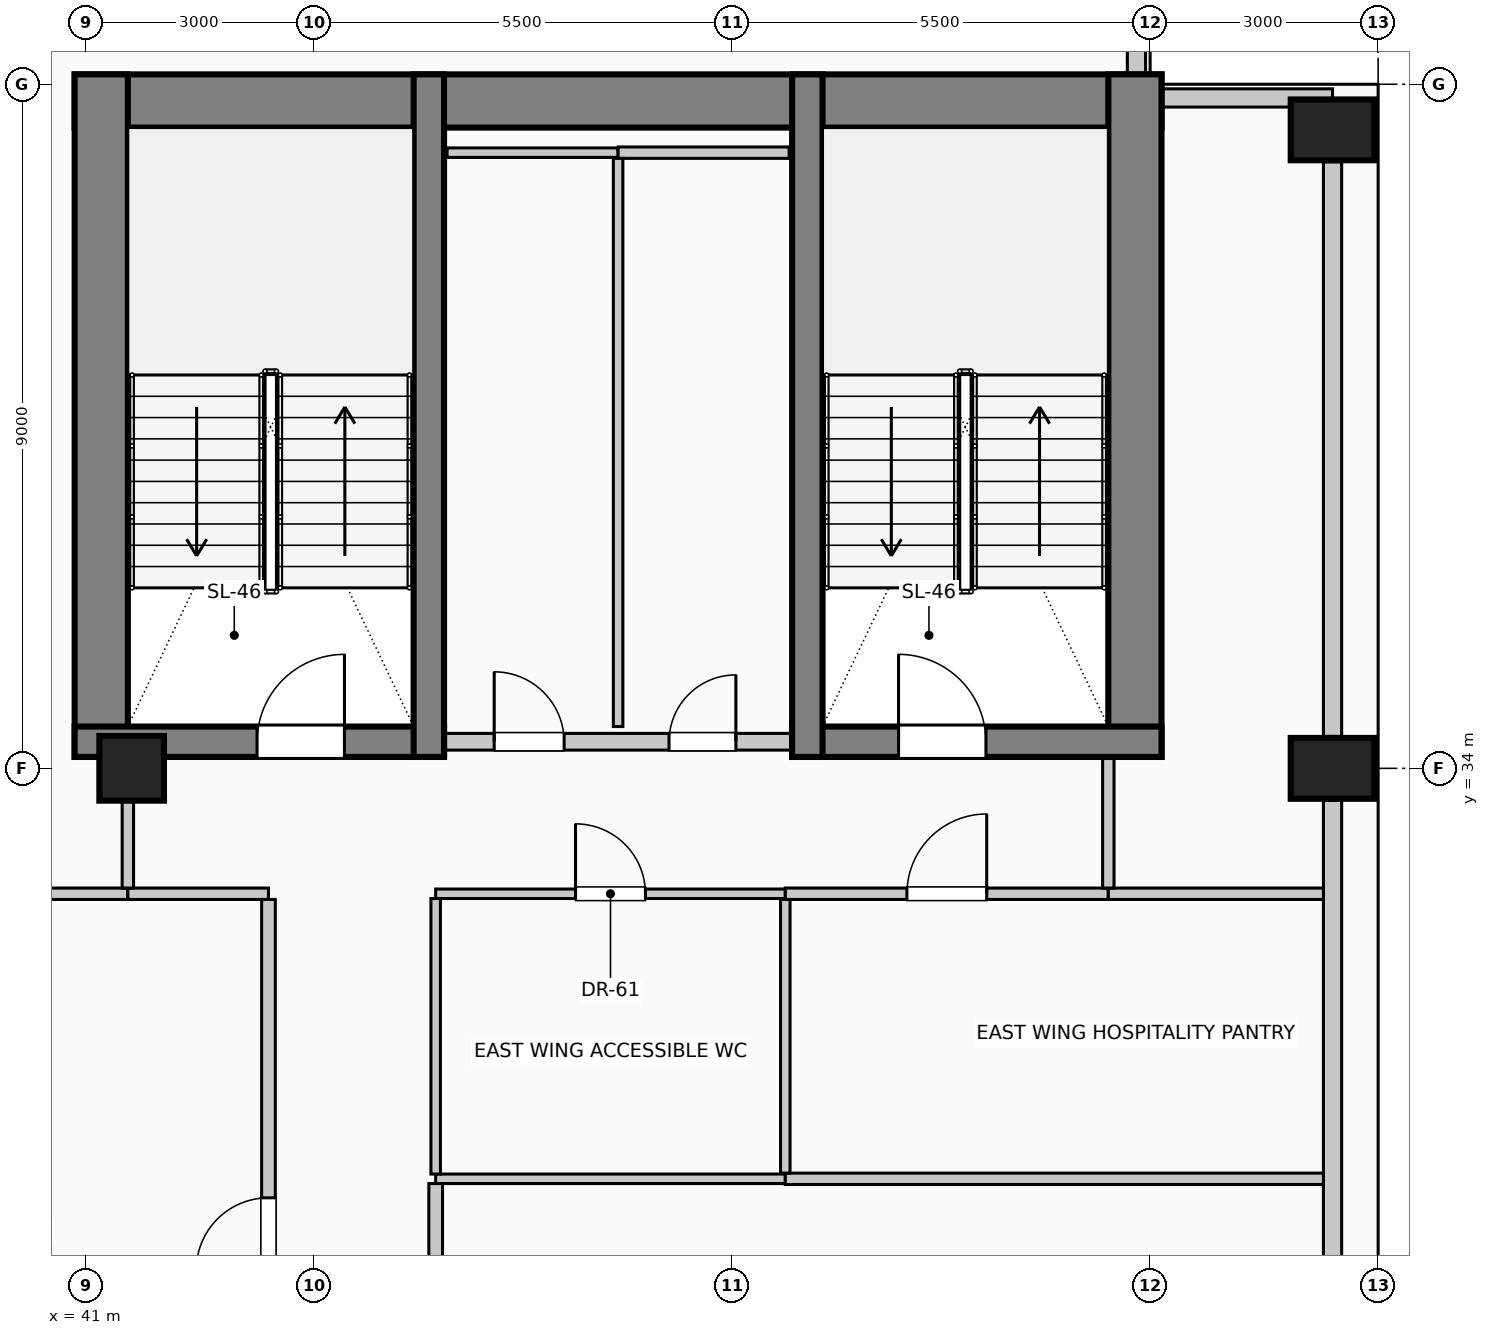
"""IFC4 building model, lengths in metres.
Left out: names, types, materials, properties, quantities, classifications, styles, units other than length and angle.
Written with IfcOpenShell. Run it as: python <this file> out.ifc"""

import sys

from ifc_helpers import new_model, si_unit, direction, frame, frame_2d, origin, origin_2d, place, context, subcontext, project, spatial, rectangle, circle, extrude, element, fill, save


model = new_model("IFC4")
c1 = context("Model", 3, precision=1e-05, world=origin(), true_north=direction((0.0, 1.0)))
c2 = subcontext(c1, "Body", "Model", "MODEL_VIEW")
j1 = project(units=[si_unit("LENGTHUNIT", "METRE"), si_unit("PLANEANGLEUNIT", "RADIAN")], contexts=[c1])
p1 = place(None, origin())
s1 = spatial("IfcSite", under=j1, at=p1, CompositionType="ELEMENT")
p2 = place(p1, origin())
s2 = spatial("IfcBuilding", under=s1, at=p2, CompositionType="ELEMENT")
p3 = place(p2, frame((0.0, 0.0, 190.6)))
s3 = spatial("IfcBuildingStorey", under=s2, at=p3, CompositionType="ELEMENT", Elevation=190.6)
p4 = place(p3, frame((40.85, 42.78, 0.0), z_axis=(0.0, 0.0, 1.0), x_axis=(1.0, 0.0, 0.0)))
e1 = element("IfcWall", 1, at=p4, inside=s3, PredefinedType="SHEAR", context=c2, shape_type="SweptSolid", body=[
    extrude(rectangle(XDim=14.3, YDim=0.7, at=frame_2d((7.15, 0.0))), origin(), (0.0, 0.0, 1.0), 4.0),
])
for number, where, z_axis, x_axis in (
    (2, (41.2, 34.15, 0.0), (0.0, 0.0, 1.0), (0.0, 1.0, 0.0)),
    (3, (54.8, 34.15, 0.0), (0.0, 0.0, 1.0), (0.0, 1.0, 0.0)),
):
    element("IfcWall", number, at=place(p3, frame(where, z_axis=z_axis, x_axis=x_axis)), inside=s3, PredefinedType="SHEAR", context=c2, shape_type="SweptSolid", body=[
        extrude(rectangle(XDim=8.98, YDim=0.7, at=frame_2d((4.49, 0.0))), origin(), (0.0, 0.0, 1.0), 4.0),
    ])
p5 = place(p3, frame((40.85, 34.35, 0.0), z_axis=(0.0, 0.0, 1.0), x_axis=(1.0, 0.0, 0.0)))
e4 = element("IfcWall", 4, at=p5, inside=s3, PredefinedType="SHEAR", context=c2, shape_type="SweptSolid", body=[
    extrude(rectangle(XDim=4.86, YDim=0.4, at=frame_2d((2.43, 0.0))), origin(), (0.0, 0.0, 1.0), 4.0),
])
p6 = place(p5, frame((2.4, 0.0, 0.0)))
e5 = element("IfcOpeningElement", 5, at=p6, cuts=e4, PredefinedType="OPENING", context=c2, shape_type="SweptSolid", body=[
    extrude(rectangle(XDim=1.15, YDim=2.2, at=frame_2d((0.575, 1.1))), frame((0.0, 0.21, 0.0), z_axis=(0.0, -1.0, 0.0), x_axis=(1.0, 0.0, 0.0)), (0.0, 0.0, 1.0), 0.42),
])
p7 = place(p3, frame((45.51, 34.15, 0.0), z_axis=(0.0, 0.0, 1.0), x_axis=(0.0, 1.0, 0.0)))
e6 = element("IfcWall", 6, at=p7, inside=s3, PredefinedType="SHEAR", context=c2, shape_type="SweptSolid", body=[
    extrude(rectangle(XDim=8.98, YDim=0.4, at=frame_2d((4.49, 0.0))), origin(), (0.0, 0.0, 1.0), 4.0),
])
p8 = place(p3, frame((50.29, 34.35, 0.0), z_axis=(0.0, 0.0, 1.0), x_axis=(1.0, 0.0, 0.0)))
e7 = element("IfcWall", 7, at=p8, inside=s3, PredefinedType="SHEAR", context=c2, shape_type="SweptSolid", body=[
    extrude(rectangle(XDim=4.86, YDim=0.4, at=frame_2d((2.43, 0.0))), origin(), (0.0, 0.0, 1.0), 4.0),
])
p9 = place(p8, frame((1.4, 0.0, 0.0)))
e8 = element("IfcOpeningElement", 8, at=p9, cuts=e7, PredefinedType="OPENING", context=c2, shape_type="SweptSolid", body=[
    extrude(rectangle(XDim=1.15, YDim=2.2, at=frame_2d((0.575, 1.1))), frame((0.0, 0.21, 0.0), z_axis=(0.0, -1.0, 0.0), x_axis=(1.0, 0.0, 0.0)), (0.0, 0.0, 1.0), 0.42),
])
p10 = place(p3, frame((50.49, 34.15, 0.0), z_axis=(0.0, 0.0, 1.0), x_axis=(0.0, 1.0, 0.0)))
e9 = element("IfcWall", 9, at=p10, inside=s3, PredefinedType="SHEAR", context=c2, shape_type="SweptSolid", body=[
    extrude(rectangle(XDim=8.98, YDim=0.4, at=frame_2d((4.49, 0.0))), origin(), (0.0, 0.0, 1.0), 4.0),
])
for number, where, z_axis, x_axis in (
    (10, (57.4, 34.0, 0.0), (0.0, 0.0, 1.0), (0.0, 1.0, 0.0)),
    (11, (57.4, 42.4, 0.0), (0.0, 0.0, 1.0), (0.0, 1.0, 0.0)),
):
    element("IfcColumn", number, at=place(p3, frame(where, z_axis=z_axis, x_axis=x_axis)), inside=s3, PredefinedType="COLUMN", context=c2, shape_type="SweptSolid", body=[
        extrude(rectangle(XDim=0.8, YDim=1.1, at=origin_2d()), origin(), (0.0, 0.0, 1.0), 4.0),
    ])
p11 = place(p3, frame((41.6, 34.0, 0.0), z_axis=(0.0, 0.0, 1.0), x_axis=(1.0, 0.0, 0.0)))
e12 = element("IfcColumn", 12, at=p11, inside=s3, PredefinedType="COLUMN", context=c2, shape_type="SweptSolid", body=[
    extrude(circle(Radius=0.425, at=origin_2d()), origin(), (0.0, 0.0, 1.0), 4.0),
])
p12 = place(p3, frame((57.4, 33.58, 0.0), z_axis=(0.0, 0.0, 1.0), x_axis=(0.0, -1.0, 0.0)))
e13 = element("IfcWall", 13, at=p12, inside=s3, PredefinedType="SOLIDWALL", context=c2, shape_type="SweptSolid", body=[
    extrude(rectangle(XDim=7.16, YDim=0.24, at=frame_2d((3.58, 0.0))), origin(), (0.0, 0.0, 1.0), 3.0),
])
p13 = place(p3, frame((57.4, 41.98, 0.0), z_axis=(0.0, 0.0, 1.0), x_axis=(0.0, -1.0, 0.0)))
e14 = element("IfcWall", 14, at=p13, inside=s3, PredefinedType="SOLIDWALL", context=c2, shape_type="SweptSolid", body=[
    extrude(rectangle(XDim=7.56, YDim=0.24, at=frame_2d((3.78, 0.0))), origin(), (0.0, 0.0, 1.0), 3.0),
])
p14 = place(p3, frame((54.82, 45.4, 0.0), z_axis=(0.0, 0.0, 1.0), x_axis=(0.0, -1.0, 0.0)))
e15 = element("IfcWall", 15, at=p14, inside=s3, PredefinedType="SOLIDWALL", context=c2, shape_type="SweptSolid", body=[
    extrude(rectangle(XDim=2.265, YDim=0.24, at=frame_2d((1.132, 0.0))), origin(), (0.0, 0.0, 1.0), 3.75),
])
p15 = place(p3, frame((55.155, 42.82, 0.0), z_axis=(0.0, 0.0, 1.0), x_axis=(1.0, 0.0, 0.0)))
e16 = element("IfcWall", 16, at=p15, inside=s3, PredefinedType="SOLIDWALL", context=c2, shape_type="SweptSolid", body=[
    extrude(rectangle(XDim=2.245, YDim=0.24, at=frame_2d((1.123, 0.0))), origin(), (0.0, 0.0, 1.0), 3.75),
])
p16 = place(p3, frame((45.72, 34.35, 0.0), z_axis=(0.0, 0.0, 1.0), x_axis=(1.0, 0.0, 0.0)))
e17 = element("IfcWall", 17, at=p16, inside=s3, PredefinedType="PARTITIONING", context=c2, shape_type="SweptSolid", body=[
    extrude(rectangle(XDim=4.56, YDim=0.22, at=frame_2d((2.28, 0.0))), origin(), (0.0, 0.0, 1.0), 3.75),
])
p17 = place(p16, frame((0.65, 0.0, 0.0)))
e18 = element("IfcOpeningElement", 18, at=p17, cuts=e17, PredefinedType="OPENING", context=c2, shape_type="SweptSolid", body=[
    extrude(rectangle(XDim=0.92, YDim=2.1, at=frame_2d((0.46, 1.05))), frame((0.0, 0.12, 0.0), z_axis=(0.0, -1.0, 0.0), x_axis=(1.0, 0.0, 0.0)), (0.0, 0.0, 1.0), 0.24),
])
p18 = place(p16, frame((2.95, 0.0, 0.0)))
e19 = element("IfcOpeningElement", 19, at=p18, cuts=e17, PredefinedType="OPENING", context=c2, shape_type="SweptSolid", body=[
    extrude(rectangle(XDim=0.88, YDim=2.1, at=frame_2d((0.44, 1.05))), frame((0.0, 0.12, 0.0), z_axis=(0.0, -1.0, 0.0), x_axis=(1.0, 0.0, 0.0)), (0.0, 0.0, 1.0), 0.24),
])
p19 = place(p3, frame((45.6, 28.6, 0.0), z_axis=(0.0, 0.0, 1.0), x_axis=(1.0, 0.0, 0.0)))
e20 = element("IfcWall", 20, at=p19, inside=s3, PredefinedType="PARTITIONING", context=c2, shape_type="SweptSolid", body=[
    extrude(rectangle(XDim=4.6, YDim=0.125, at=frame_2d((2.3, 0.0))), origin(), (0.0, 0.0, 1.0), 3.75),
])
p20 = place(p3, frame((50.2, 28.6, 0.0), z_axis=(0.0, 0.0, 1.0), x_axis=(1.0, 0.0, 0.0)))
e21 = element("IfcWall", 21, at=p20, inside=s3, PredefinedType="PARTITIONING", context=c2, shape_type="SweptSolid", body=[
    extrude(rectangle(XDim=7.08, YDim=0.15, at=frame_2d((3.54, 0.0))), origin(), (0.0, 0.0, 1.0), 3.75),
])
p21 = place(p3, frame((34.12, 32.35, 0.0), z_axis=(0.0, 0.0, 1.0), x_axis=(1.0, 0.0, 0.0)))
e22 = element("IfcWall", 22, at=p21, inside=s3, PredefinedType="PARTITIONING", context=c2, shape_type="SweptSolid", body=[
    extrude(rectangle(XDim=7.43, YDim=0.15, at=frame_2d((3.715, 0.0))), origin(), (0.0, 0.0, 1.0), 3.75),
])
p22 = place(p3, frame((41.55, 32.35, 0.0), z_axis=(0.0, 0.0, 1.0), x_axis=(1.0, 0.0, 0.0)))
e23 = element("IfcWall", 23, at=p22, inside=s3, PredefinedType="PARTITIONING", context=c2, shape_type="SweptSolid", body=[
    extrude(rectangle(XDim=1.85, YDim=0.15, at=frame_2d((0.925, 0.0))), origin(), (0.0, 0.0, 1.0), 3.75),
])
p23 = place(p3, frame((45.6, 32.35, 0.0), z_axis=(0.0, 0.0, 1.0), x_axis=(1.0, 0.0, 0.0)))
e24 = element("IfcWall", 24, at=p23, inside=s3, PredefinedType="PARTITIONING", context=c2, shape_type="SweptSolid", body=[
    extrude(rectangle(XDim=4.6, YDim=0.125, at=frame_2d((2.3, 0.0))), origin(), (0.0, 0.0, 1.0), 3.75),
])
p24 = place(p23, frame((1.84, 0.0, 0.0)))
e25 = element("IfcOpeningElement", 25, at=p24, cuts=e24, PredefinedType="OPENING", context=c2, shape_type="SweptSolid", body=[
    extrude(rectangle(XDim=0.92, YDim=2.1, at=frame_2d((0.46, 1.05))), frame((0.0, 0.073, 0.0), z_axis=(0.0, -1.0, 0.0), x_axis=(1.0, 0.0, 0.0)), (0.0, 0.0, 1.0), 0.145),
])
p25 = place(p3, frame((50.2, 32.35, 0.0), z_axis=(0.0, 0.0, 1.0), x_axis=(1.0, 0.0, 0.0)))
e26 = element("IfcWall", 26, at=p25, inside=s3, PredefinedType="PARTITIONING", context=c2, shape_type="SweptSolid", body=[
    extrude(rectangle(XDim=4.25, YDim=0.15, at=frame_2d((2.125, 0.0))), origin(), (0.0, 0.0, 1.0), 3.75),
])
p26 = place(p25, frame((1.6, 0.0, 0.0)))
e27 = element("IfcOpeningElement", 27, at=p26, cuts=e26, PredefinedType="OPENING", context=c2, shape_type="SweptSolid", body=[
    extrude(rectangle(XDim=1.05, YDim=2.15, at=frame_2d((0.525, 1.075))), frame((0.0, 0.085, 0.0), z_axis=(0.0, -1.0, 0.0), x_axis=(1.0, 0.0, 0.0)), (0.0, 0.0, 1.0), 0.17),
])
p27 = place(p3, frame((54.45, 32.35, 0.0), z_axis=(0.0, 0.0, 1.0), x_axis=(1.0, 0.0, 0.0)))
e28 = element("IfcWall", 28, at=p27, inside=s3, PredefinedType="PARTITIONING", context=c2, shape_type="SweptSolid", body=[
    extrude(rectangle(XDim=2.83, YDim=0.15, at=frame_2d((1.415, 0.0))), origin(), (0.0, 0.0, 1.0), 3.75),
])
p28 = place(p3, frame((45.75, 42.1, 0.0), z_axis=(0.0, 0.0, 1.0), x_axis=(1.0, 0.0, 0.0)))
e29 = element("IfcWall", 29, at=p28, inside=s3, PredefinedType="PARTITIONING", context=c2, shape_type="SweptSolid", body=[
    extrude(rectangle(XDim=2.25, YDim=0.125, at=frame_2d((1.125, 0.0))), origin(), (0.0, 0.0, 1.0), 3.75),
])
p29 = place(p3, frame((48.0, 42.1, 0.0), z_axis=(0.0, 0.0, 1.0), x_axis=(1.0, 0.0, 0.0)))
e30 = element("IfcWall", 30, at=p29, inside=s3, PredefinedType="PARTITIONING", context=c2, shape_type="SweptSolid", body=[
    extrude(rectangle(XDim=2.25, YDim=0.15, at=frame_2d((1.125, 0.0))), origin(), (0.0, 0.0, 1.0), 3.75),
])
p30 = place(p3, frame((41.55, 32.425, 0.0), z_axis=(0.0, 0.0, 1.0), x_axis=(0.0, 1.0, 0.0)))
e31 = element("IfcWall", 31, at=p30, inside=s3, PredefinedType="PARTITIONING", context=c2, shape_type="SweptSolid", body=[
    extrude(rectangle(XDim=1.15, YDim=0.15, at=frame_2d((0.575, 0.0))), origin(), (0.0, 0.0, 1.0), 3.145),
])
p31 = place(p3, frame((43.4, 23.475, 0.0), z_axis=(0.0, 0.0, 1.0), x_axis=(0.0, 1.0, 0.0)))
e32 = element("IfcWall", 32, at=p31, inside=s3, PredefinedType="PARTITIONING", context=c2, shape_type="SweptSolid", body=[
    extrude(rectangle(XDim=8.8, YDim=0.18, at=frame_2d((4.4, 0.0))), origin(), (0.0, 0.0, 1.0), 3.75),
])
p32 = place(p31, frame((3.925, 0.0, 0.0)))
e33 = element("IfcOpeningElement", 33, at=p32, cuts=e32, PredefinedType="OPENING", context=c2, shape_type="SweptSolid", body=[
    extrude(rectangle(XDim=0.95, YDim=2.15, at=frame_2d((0.475, 1.075))), frame((0.0, 0.1, 0.0), z_axis=(0.0, -1.0, 0.0), x_axis=(1.0, 0.0, 0.0)), (0.0, 0.0, 1.0), 0.2),
])
p33 = place(p3, frame((45.6, 14.39, 0.0), z_axis=(0.0, 0.0, 1.0), x_axis=(0.0, 1.0, 0.0)))
e34 = element("IfcWall", 34, at=p33, inside=s3, PredefinedType="PARTITIONING", context=c2, shape_type="SweptSolid", body=[
    extrude(rectangle(XDim=14.148, YDim=0.18, at=frame_2d((7.074, 0.0))), origin(), (0.0, 0.0, 1.0), 3.75),
])
p34 = place(p3, frame((45.6, 28.663, 0.0), z_axis=(0.0, 0.0, 1.0), x_axis=(0.0, 1.0, 0.0)))
e35 = element("IfcWall", 35, at=p34, inside=s3, PredefinedType="PARTITIONING", context=c2, shape_type="SweptSolid", body=[
    extrude(rectangle(XDim=3.625, YDim=0.125, at=frame_2d((1.812, 0.0))), origin(), (0.0, 0.0, 1.0), 3.75),
])
p35 = place(p3, frame((48.0, 34.55, 0.0), z_axis=(0.0, 0.0, 1.0), x_axis=(0.0, 1.0, 0.0)))
e36 = element("IfcWall", 36, at=p35, inside=s3, PredefinedType="PARTITIONING", context=c2, shape_type="SweptSolid", body=[
    extrude(rectangle(XDim=7.475, YDim=0.125, at=frame_2d((3.737, 0.0))), origin(), (0.0, 0.0, 1.0), 3.75),
])
p36 = place(p3, frame((50.2, 28.675, 0.0), z_axis=(0.0, 0.0, 1.0), x_axis=(0.0, 1.0, 0.0)))
e37 = element("IfcWall", 37, at=p36, inside=s3, PredefinedType="PARTITIONING", context=c2, shape_type="SweptSolid", body=[
    extrude(rectangle(XDim=3.6, YDim=0.125, at=frame_2d((1.8, 0.0))), origin(), (0.0, 0.0, 1.0), 3.75),
])
p37 = place(p3, frame((54.45, 32.425, 0.0), z_axis=(0.0, 0.0, 1.0), x_axis=(0.0, 1.0, 0.0)))
e38 = element("IfcWall", 38, at=p37, inside=s3, PredefinedType="PARTITIONING", context=c2, shape_type="SweptSolid", body=[
    extrude(rectangle(XDim=1.725, YDim=0.15, at=frame_2d((0.862, 0.0))), origin(), (0.0, 0.0, 1.0), 3.75),
])
p38 = place(p6, origin())
e39 = element("IfcDoor", 39, at=p38, inside=s3, OperationType="SINGLE_SWING_RIGHT", PredefinedType="DOOR", context=c2, shape_type="SweptSolid", body=[
    extrude(rectangle(XDim=1.15, YDim=2.2, at=frame_2d((0.575, 1.1))), frame((0.0, 0.025, 0.0), z_axis=(0.0, -1.0, 0.0), x_axis=(1.0, 0.0, 0.0)), (0.0, 0.0, 1.0), 0.05),
])
fill(e5, e39)
p39 = place(p17, origin())
e40 = element("IfcDoor", 40, at=p39, inside=s3, OperationType="SINGLE_SWING_LEFT", PredefinedType="DOOR", context=c2, shape_type="SweptSolid", body=[
    extrude(rectangle(XDim=0.92, YDim=2.1, at=frame_2d((0.46, 1.05))), frame((0.0, 0.025, 0.0), z_axis=(0.0, -1.0, 0.0), x_axis=(1.0, 0.0, 0.0)), (0.0, 0.0, 1.0), 0.05),
])
fill(e18, e40)
p40 = place(p18, origin())
e41 = element("IfcDoor", 41, at=p40, inside=s3, OperationType="SINGLE_SWING_RIGHT", PredefinedType="DOOR", context=c2, shape_type="SweptSolid", body=[
    extrude(rectangle(XDim=0.88, YDim=2.1, at=frame_2d((0.44, 1.05))), frame((0.0, 0.025, 0.0), z_axis=(0.0, -1.0, 0.0), x_axis=(1.0, 0.0, 0.0)), (0.0, 0.0, 1.0), 0.05),
])
fill(e19, e41)
p41 = place(p9, origin())
e42 = element("IfcDoor", 42, at=p41, inside=s3, OperationType="SINGLE_SWING_LEFT", PredefinedType="DOOR", context=c2, shape_type="SweptSolid", body=[
    extrude(rectangle(XDim=1.15, YDim=2.2, at=frame_2d((0.575, 1.1))), frame((0.0, 0.025, 0.0), z_axis=(0.0, -1.0, 0.0), x_axis=(1.0, 0.0, 0.0)), (0.0, 0.0, 1.0), 0.05),
])
fill(e8, e42)
p42 = place(p24, origin())
e43 = element("IfcDoor", 43, at=p42, inside=s3, OperationType="SINGLE_SWING_LEFT", PredefinedType="DOOR", context=c2, shape_type="SweptSolid", body=[
    extrude(rectangle(XDim=0.92, YDim=2.1, at=frame_2d((0.46, 1.05))), frame((0.0, 0.025, 0.0), z_axis=(0.0, -1.0, 0.0), x_axis=(1.0, 0.0, 0.0)), (0.0, 0.0, 1.0), 0.05),
])
fill(e25, e43)
p43 = place(p26, origin())
e44 = element("IfcDoor", 44, at=p43, inside=s3, OperationType="SINGLE_SWING_RIGHT", PredefinedType="DOOR", context=c2, shape_type="SweptSolid", body=[
    extrude(rectangle(XDim=1.05, YDim=2.15, at=frame_2d((0.525, 1.075))), frame((0.0, 0.025, 0.0), z_axis=(0.0, -1.0, 0.0), x_axis=(1.0, 0.0, 0.0)), (0.0, 0.0, 1.0), 0.05),
])
fill(e27, e44)
p44 = place(p32, origin())
e45 = element("IfcDoor", 45, at=p44, inside=s3, OperationType="SINGLE_SWING_LEFT", PredefinedType="DOOR", context=c2, shape_type="SweptSolid", body=[
    extrude(rectangle(XDim=0.95, YDim=2.15, at=frame_2d((0.475, 1.075))), frame((0.0, 0.025, 0.0), z_axis=(0.0, -1.0, 0.0), x_axis=(1.0, 0.0, 0.0)), (0.0, 0.0, 1.0), 0.05),
])
fill(e33, e45)
save(model, sys.argv[1])
